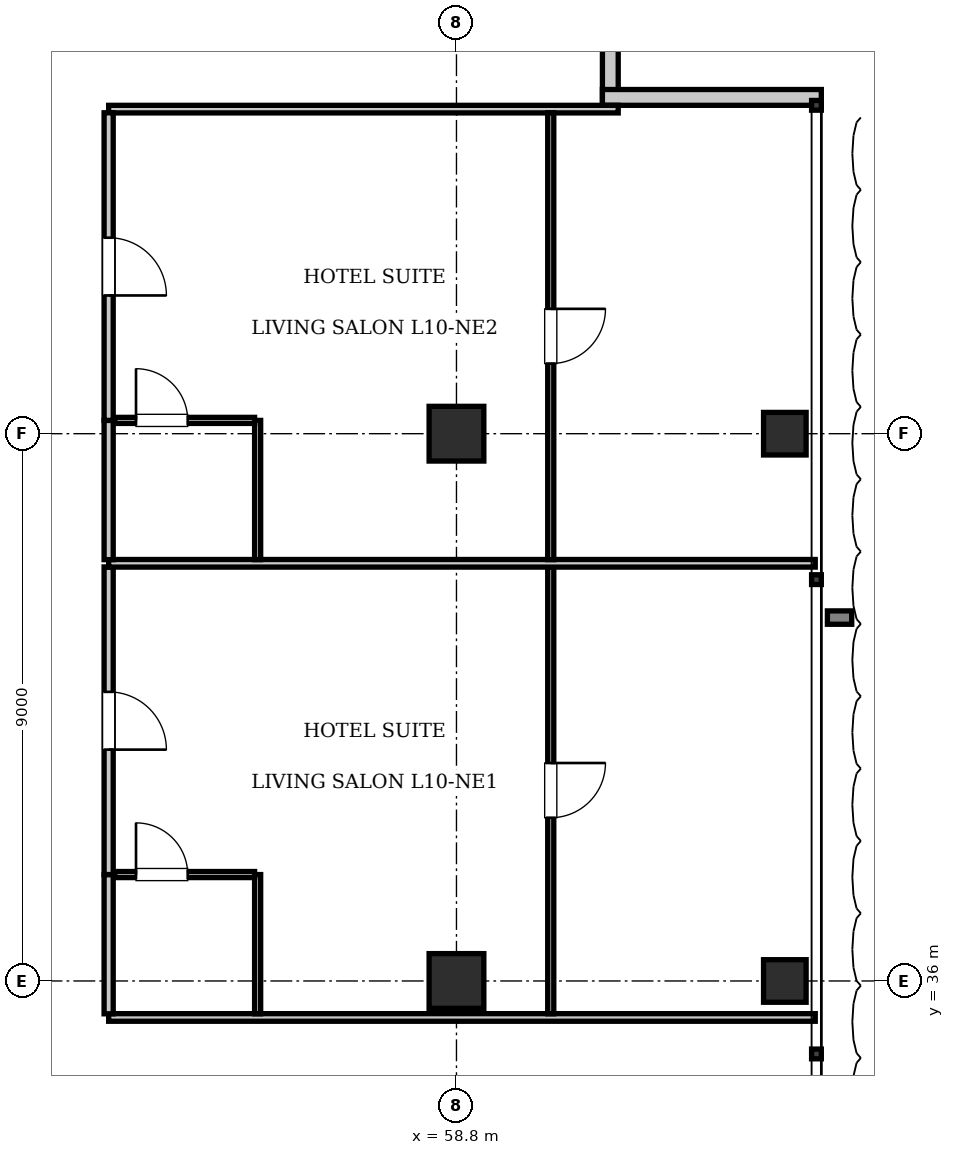
"""IFC4 building model, lengths in metres.
Left out: names, types, materials, properties, quantities, classifications, styles, units other than length and angle.
Written with IfcOpenShell. Run it as: python <this file> out.ifc"""

import sys

from ifc_helpers import new_model, si_unit, direction, frame, frame_2d, origin, origin_2d, place, context, subcontext, project, spatial, rectangle, i_section, extrude, element, fill, save


model = new_model("IFC4")
c1 = context("Model", 3, precision=1e-05, world=origin(), true_north=direction((0.0, 1.0)))
c2 = subcontext(c1, "Body", "Model", "MODEL_VIEW")
j1 = project(units=[si_unit("LENGTHUNIT", "METRE"), si_unit("PLANEANGLEUNIT", "RADIAN")], contexts=[c1])
p1 = place(None, origin())
s1 = spatial("IfcSite", under=j1, at=p1, CompositionType="ELEMENT")
p2 = place(p1, origin())
s2 = spatial("IfcBuilding", under=s1, at=p2, CompositionType="ELEMENT")
p3 = place(p2, frame((0.0, 0.0, 46.2)))
s3 = spatial("IfcBuildingStorey", under=s2, at=p3, CompositionType="ELEMENT", Elevation=46.2)
for number, where, z_axis, x_axis in (
    (1, (58.8, 36.0, 0.0), (0.0, 0.0, 1.0), (1.0, 0.0, 0.0)),
    (2, (58.8, 45.0, 0.0), (0.0, 0.0, 1.0), (1.0, 0.0, 0.0)),
):
    element("IfcColumn", number, at=place(p3, frame(where, z_axis=z_axis, x_axis=x_axis)), inside=s3, PredefinedType="COLUMN", context=c2, shape_type="SweptSolid", body=[
        extrude(rectangle(XDim=0.9, YDim=0.9, at=origin_2d()), origin(), (0.0, 0.0, 1.0), 3.85),
    ])
for number, where, z_axis, x_axis in (
    (3, (64.2, 36.0, 0.0), (0.0, 0.0, 1.0), (1.0, 0.0, 0.0)),
    (4, (64.2, 45.0, 0.0), (0.0, 0.0, 1.0), (1.0, 0.0, 0.0)),
):
    element("IfcColumn", number, at=place(p3, frame(where, z_axis=z_axis, x_axis=x_axis)), inside=s3, PredefinedType="COLUMN", context=c2, shape_type="SweptSolid", body=[
        extrude(i_section(OverallWidth=0.7, OverallDepth=0.7, WebThickness=0.028, FlangeThickness=0.044, at=origin_2d()), origin(), (0.0, 0.0, 1.0), 3.85),
    ])
for number, where, z_axis, x_axis in (
    (5, (61.33, 54.0, 0.0), (0.0, 0.0, 1.0), (0.0, -1.0, 0.0)),
    (6, (61.2, 50.53, 0.0), (0.0, 0.0, 1.0), (1.0, 0.0, 0.0)),
):
    element("IfcWall", number, at=place(p3, frame(where, z_axis=z_axis, x_axis=x_axis)), inside=s3, PredefinedType="SOLIDWALL", context=c2, shape_type="SweptSolid", body=[
        extrude(rectangle(XDim=3.6, YDim=0.26, at=frame_2d((1.8, 0.0))), origin(), (0.0, 0.0, 1.0), 3.61),
    ])
p4 = place(p3, frame((53.08, 35.4, 0.0), z_axis=(0.0, 0.0, 1.0), x_axis=(1.0, 0.0, 0.0)))
e7 = element("IfcWall", 7, at=p4, inside=s3, PredefinedType="PARTITIONING", context=c2, shape_type="SweptSolid", body=[
    extrude(rectangle(XDim=11.62, YDim=0.125, at=frame_2d((5.81, 0.0))), origin(), (0.0, 0.0, 1.0), 3.61),
])
p5 = place(p3, frame((53.08, 50.337, 0.0), z_axis=(0.0, 0.0, 1.0), x_axis=(1.0, 0.0, 0.0)))
e8 = element("IfcWall", 8, at=p5, inside=s3, PredefinedType="PARTITIONING", context=c2, shape_type="SweptSolid", body=[
    extrude(rectangle(XDim=8.38, YDim=0.125, at=frame_2d((4.19, 0.0))), origin(), (0.0, 0.0, 1.0), 3.61),
])
p6 = place(p3, frame((53.08, 35.46, 0.0), z_axis=(0.0, 0.0, 1.0), x_axis=(0.0, 1.0, 0.0)))
e9 = element("IfcWall", 9, at=p6, inside=s3, PredefinedType="PARTITIONING", context=c2, shape_type="SweptSolid", body=[
    extrude(rectangle(XDim=2.29, YDim=0.15, at=frame_2d((1.145, 0.0))), origin(), (0.0, 0.0, 1.0), 3.61),
])
p7 = place(p3, frame((53.08, 37.75, 0.0), z_axis=(0.0, 0.0, 1.0), x_axis=(0.0, 1.0, 0.0)))
e10 = element("IfcWall", 10, at=p7, inside=s3, PredefinedType="PARTITIONING", context=c2, shape_type="SweptSolid", body=[
    extrude(rectangle(XDim=5.059, YDim=0.15, at=frame_2d((2.529, 0.0))), origin(), (0.0, 0.0, 1.0), 3.61),
])
p8 = place(p7, frame((2.054, 0.0, 0.0)))
e11 = element("IfcOpeningElement", 11, at=p8, cuts=e10, PredefinedType="OPENING", context=c2, shape_type="SweptSolid", body=[
    extrude(rectangle(XDim=0.95, YDim=2.15, at=frame_2d((0.475, 1.075))), frame((0.0, 0.085, 0.0), z_axis=(0.0, -1.0, 0.0), x_axis=(1.0, 0.0, 0.0)), (0.0, 0.0, 1.0), 0.17),
])
p9 = place(p3, frame((55.53, 35.46, 0.0), z_axis=(0.0, 0.0, 1.0), x_axis=(0.0, 1.0, 0.0)))
e12 = element("IfcWall", 12, at=p9, inside=s3, PredefinedType="PARTITIONING", context=c2, shape_type="SweptSolid", body=[
    extrude(rectangle(XDim=2.29, YDim=0.1, at=frame_2d((1.145, 0.0))), origin(), (0.0, 0.0, 1.0), 3.61),
])
p10 = place(p3, frame((53.18, 37.75, 0.0), z_axis=(0.0, 0.0, 1.0), x_axis=(1.0, 0.0, 0.0)))
e13 = element("IfcWall", 13, at=p10, inside=s3, PredefinedType="PARTITIONING", context=c2, shape_type="SweptSolid", body=[
    extrude(rectangle(XDim=2.3, YDim=0.1, at=frame_2d((1.15, 0.0))), origin(), (0.0, 0.0, 1.0), 3.61),
])
p11 = place(p10, frame((0.35, 0.0, 0.0)))
e14 = element("IfcOpeningElement", 14, at=p11, cuts=e13, PredefinedType="OPENING", context=c2, shape_type="SweptSolid", body=[
    extrude(rectangle(XDim=0.85, YDim=2.1, at=frame_2d((0.425, 1.05))), frame((0.0, 0.06, 0.0), z_axis=(0.0, -1.0, 0.0), x_axis=(1.0, 0.0, 0.0)), (0.0, 0.0, 1.0), 0.12),
])
p12 = place(p3, frame((60.35, 35.46, 0.0), z_axis=(0.0, 0.0, 1.0), x_axis=(0.0, 1.0, 0.0)))
e15 = element("IfcWall", 15, at=p12, inside=s3, PredefinedType="PARTITIONING", context=c2, shape_type="SweptSolid", body=[
    extrude(rectangle(XDim=7.349, YDim=0.1, at=frame_2d((3.674, 0.0))), origin(), (0.0, 0.0, 1.0), 3.61),
])
p13 = place(p12, frame((3.224, 0.0, 0.0)))
e16 = element("IfcOpeningElement", 16, at=p13, cuts=e15, PredefinedType="OPENING", context=c2, shape_type="SweptSolid", body=[
    extrude(rectangle(XDim=0.9, YDim=2.1, at=frame_2d((0.45, 1.05))), frame((0.0, 0.06, 0.0), z_axis=(0.0, -1.0, 0.0), x_axis=(1.0, 0.0, 0.0)), (0.0, 0.0, 1.0), 0.12),
])
p14 = place(p3, frame((53.08, 42.869, 0.0), z_axis=(0.0, 0.0, 1.0), x_axis=(1.0, 0.0, 0.0)))
e17 = element("IfcWall", 17, at=p14, inside=s3, PredefinedType="PARTITIONING", context=c2, shape_type="SweptSolid", body=[
    extrude(rectangle(XDim=11.62, YDim=0.125, at=frame_2d((5.81, 0.0))), origin(), (0.0, 0.0, 1.0), 3.61),
])
p15 = place(p3, frame((53.08, 42.929, 0.0), z_axis=(0.0, 0.0, 1.0), x_axis=(0.0, 1.0, 0.0)))
e18 = element("IfcWall", 18, at=p15, inside=s3, PredefinedType="PARTITIONING", context=c2, shape_type="SweptSolid", body=[
    extrude(rectangle(XDim=2.29, YDim=0.15, at=frame_2d((1.145, 0.0))), origin(), (0.0, 0.0, 1.0), 3.61),
])
p16 = place(p3, frame((53.08, 45.219, 0.0), z_axis=(0.0, 0.0, 1.0), x_axis=(0.0, 1.0, 0.0)))
e19 = element("IfcWall", 19, at=p16, inside=s3, PredefinedType="PARTITIONING", context=c2, shape_type="SweptSolid", body=[
    extrude(rectangle(XDim=5.059, YDim=0.15, at=frame_2d((2.529, 0.0))), origin(), (0.0, 0.0, 1.0), 3.61),
])
p17 = place(p16, frame((2.054, 0.0, 0.0)))
e20 = element("IfcOpeningElement", 20, at=p17, cuts=e19, PredefinedType="OPENING", context=c2, shape_type="SweptSolid", body=[
    extrude(rectangle(XDim=0.95, YDim=2.15, at=frame_2d((0.475, 1.075))), frame((0.0, 0.085, 0.0), z_axis=(0.0, -1.0, 0.0), x_axis=(1.0, 0.0, 0.0)), (0.0, 0.0, 1.0), 0.17),
])
p18 = place(p3, frame((55.53, 42.929, 0.0), z_axis=(0.0, 0.0, 1.0), x_axis=(0.0, 1.0, 0.0)))
e21 = element("IfcWall", 21, at=p18, inside=s3, PredefinedType="PARTITIONING", context=c2, shape_type="SweptSolid", body=[
    extrude(rectangle(XDim=2.29, YDim=0.1, at=frame_2d((1.145, 0.0))), origin(), (0.0, 0.0, 1.0), 3.61),
])
p19 = place(p3, frame((53.18, 45.219, 0.0), z_axis=(0.0, 0.0, 1.0), x_axis=(1.0, 0.0, 0.0)))
e22 = element("IfcWall", 22, at=p19, inside=s3, PredefinedType="PARTITIONING", context=c2, shape_type="SweptSolid", body=[
    extrude(rectangle(XDim=2.3, YDim=0.1, at=frame_2d((1.15, 0.0))), origin(), (0.0, 0.0, 1.0), 3.61),
])
p20 = place(p19, frame((0.35, 0.0, 0.0)))
e23 = element("IfcOpeningElement", 23, at=p20, cuts=e22, PredefinedType="OPENING", context=c2, shape_type="SweptSolid", body=[
    extrude(rectangle(XDim=0.85, YDim=2.1, at=frame_2d((0.425, 1.05))), frame((0.0, 0.06, 0.0), z_axis=(0.0, -1.0, 0.0), x_axis=(1.0, 0.0, 0.0)), (0.0, 0.0, 1.0), 0.12),
])
p21 = place(p3, frame((60.35, 42.929, 0.0), z_axis=(0.0, 0.0, 1.0), x_axis=(0.0, 1.0, 0.0)))
e24 = element("IfcWall", 24, at=p21, inside=s3, PredefinedType="PARTITIONING", context=c2, shape_type="SweptSolid", body=[
    extrude(rectangle(XDim=7.349, YDim=0.1, at=frame_2d((3.674, 0.0))), origin(), (0.0, 0.0, 1.0), 3.61),
])
p22 = place(p21, frame((3.224, 0.0, 0.0)))
e25 = element("IfcOpeningElement", 25, at=p22, cuts=e24, PredefinedType="OPENING", context=c2, shape_type="SweptSolid", body=[
    extrude(rectangle(XDim=0.9, YDim=2.1, at=frame_2d((0.45, 1.05))), frame((0.0, 0.06, 0.0), z_axis=(0.0, -1.0, 0.0), x_axis=(1.0, 0.0, 0.0)), (0.0, 0.0, 1.0), 0.12),
])
p23 = place(p11, origin())
e26 = element("IfcDoor", 26, at=p23, inside=s3, OperationType="SINGLE_SWING_LEFT", PredefinedType="DOOR", context=c2, shape_type="SweptSolid", body=[
    extrude(rectangle(XDim=0.85, YDim=2.1, at=frame_2d((0.425, 1.05))), frame((0.0, 0.025, 0.0), z_axis=(0.0, -1.0, 0.0), x_axis=(1.0, 0.0, 0.0)), (0.0, 0.0, 1.0), 0.05),
])
fill(e14, e26)
p24 = place(p8, frame((0.95, 0.0, 0.0), z_axis=(0.0, 0.0, 1.0), x_axis=(-1.0, 0.0, 0.0)))
e27 = element("IfcDoor", 27, at=p24, inside=s3, OperationType="SINGLE_SWING_RIGHT", PredefinedType="DOOR", context=c2, shape_type="SweptSolid", body=[
    extrude(rectangle(XDim=0.95, YDim=2.15, at=frame_2d((0.475, 1.075))), frame((0.0, 0.025, 0.0), z_axis=(0.0, -1.0, 0.0), x_axis=(1.0, 0.0, 0.0)), (0.0, 0.0, 1.0), 0.05),
])
fill(e11, e27)
p25 = place(p13, frame((0.9, 0.0, 0.0), z_axis=(0.0, 0.0, 1.0), x_axis=(-1.0, 0.0, 0.0)))
e28 = element("IfcDoor", 28, at=p25, inside=s3, OperationType="SINGLE_SWING_LEFT", PredefinedType="DOOR", context=c2, shape_type="SweptSolid", body=[
    extrude(rectangle(XDim=0.9, YDim=2.1, at=frame_2d((0.45, 1.05))), frame((0.0, 0.025, 0.0), z_axis=(0.0, -1.0, 0.0), x_axis=(1.0, 0.0, 0.0)), (0.0, 0.0, 1.0), 0.05),
])
fill(e16, e28)
p26 = place(p20, origin())
e29 = element("IfcDoor", 29, at=p26, inside=s3, OperationType="SINGLE_SWING_LEFT", PredefinedType="DOOR", context=c2, shape_type="SweptSolid", body=[
    extrude(rectangle(XDim=0.85, YDim=2.1, at=frame_2d((0.425, 1.05))), frame((0.0, 0.025, 0.0), z_axis=(0.0, -1.0, 0.0), x_axis=(1.0, 0.0, 0.0)), (0.0, 0.0, 1.0), 0.05),
])
fill(e23, e29)
p27 = place(p17, frame((0.95, 0.0, 0.0), z_axis=(0.0, 0.0, 1.0), x_axis=(-1.0, 0.0, 0.0)))
e30 = element("IfcDoor", 30, at=p27, inside=s3, OperationType="SINGLE_SWING_RIGHT", PredefinedType="DOOR", context=c2, shape_type="SweptSolid", body=[
    extrude(rectangle(XDim=0.95, YDim=2.15, at=frame_2d((0.475, 1.075))), frame((0.0, 0.025, 0.0), z_axis=(0.0, -1.0, 0.0), x_axis=(1.0, 0.0, 0.0)), (0.0, 0.0, 1.0), 0.05),
])
fill(e20, e30)
p28 = place(p22, frame((0.9, 0.0, 0.0), z_axis=(0.0, 0.0, 1.0), x_axis=(-1.0, 0.0, 0.0)))
e31 = element("IfcDoor", 31, at=p28, inside=s3, OperationType="SINGLE_SWING_LEFT", PredefinedType="DOOR", context=c2, shape_type="SweptSolid", body=[
    extrude(rectangle(XDim=0.9, YDim=2.1, at=frame_2d((0.45, 1.05))), frame((0.0, 0.025, 0.0), z_axis=(0.0, -1.0, 0.0), x_axis=(1.0, 0.0, 0.0)), (0.0, 0.0, 1.0), 0.05),
])
fill(e25, e31)
save(model, sys.argv[1])
